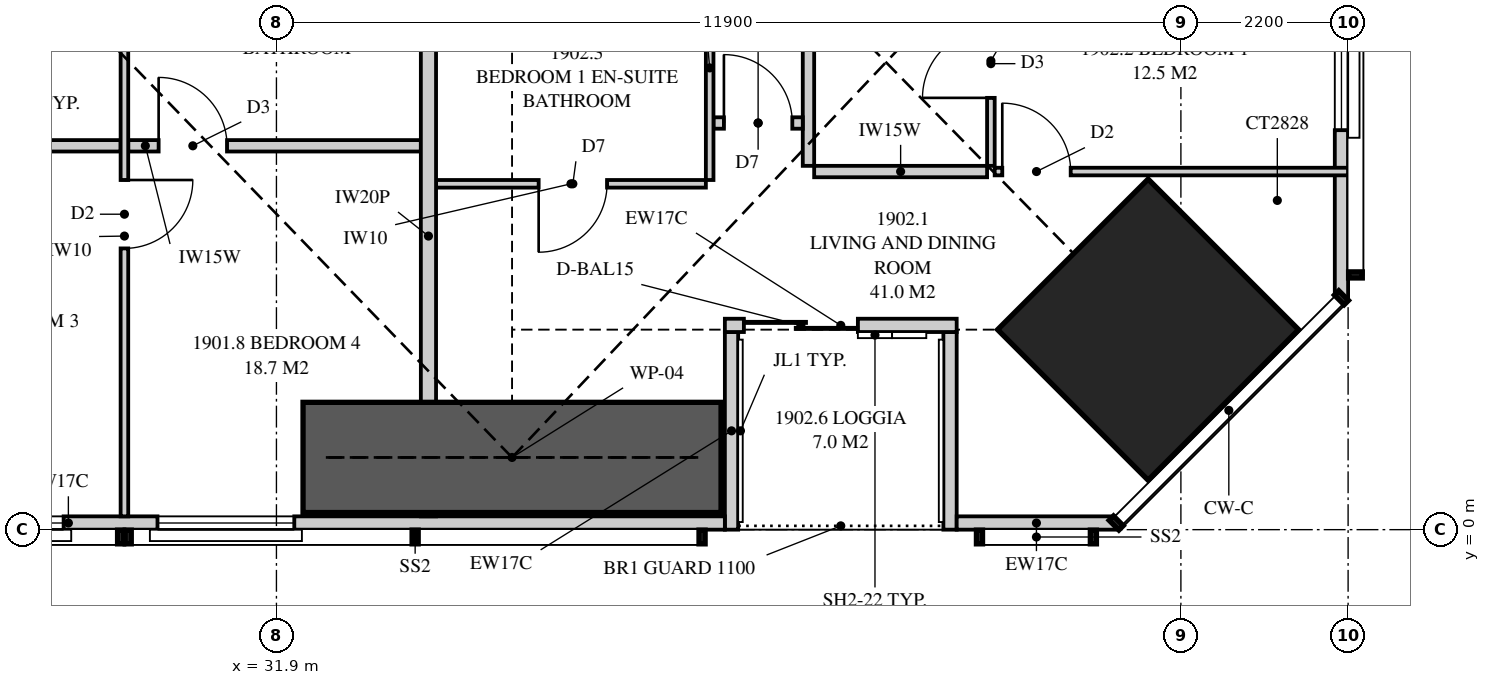
"""IFC4 building model, lengths in metres.
Left out: names, types, materials, properties, quantities, classifications, styles, units other than length and angle.
Written with IfcOpenShell. Run it as: python <this file> out.ifc"""

import sys

from ifc_helpers import new_model, si_unit, direction, frame, frame_2d, origin, origin_2d, place, context, subcontext, project, spatial, polyline, rectangle, hollow_rectangle, outline, extrude, element, fill, save


model = new_model("IFC4")
c1 = context("Model", 3, precision=1e-05, world=origin(), true_north=direction((0.0, 1.0)))
c2 = subcontext(c1, "Body", "Model", "MODEL_VIEW")
j1 = project(units=[si_unit("LENGTHUNIT", "METRE"), si_unit("PLANEANGLEUNIT", "RADIAN")], contexts=[c1])
p1 = place(None, origin())
s1 = spatial("IfcSite", under=j1, at=p1, CompositionType="ELEMENT")
p2 = place(p1, origin())
s2 = spatial("IfcBuilding", under=s1, at=p2, CompositionType="ELEMENT")
p3 = place(p2, frame((0.0, 0.0, 71.25)))
s3 = spatial("IfcBuildingStorey", under=s2, at=p3, CompositionType="ELEMENT", Elevation=71.25)
p4 = place(p3, frame((43.369, 2.631, 0.0), z_axis=(0.0, 0.0, 1.0), x_axis=(-0.707106781187, 0.707106781187, 0.0)))
e1 = element("IfcColumn", 1, at=p4, inside=s3, PredefinedType="COLUMN", context=c2, shape_type="SweptSolid", body=[
    extrude(hollow_rectangle(XDim=2.8, YDim=2.8, WallThickness=0.25, at=origin_2d()), origin(), (0.0, 0.0, 1.0), 3.5),
])
p5 = place(p3, frame((20.525, 0.087, 0.0), z_axis=(0.0, 0.0, 1.0), x_axis=(1.0, 0.0, 0.0)))
e2 = element("IfcWall", 2, at=p5, inside=s3, PredefinedType="SOLIDWALL", context=c2, shape_type="SweptSolid", body=[
    extrude(rectangle(XDim=17.275, YDim=0.175, at=frame_2d((8.638, 0.0))), origin(), (0.0, 0.0, 1.0), 3.22),
])
p6 = place(p5, frame((6.775, 0.0, 0.4)))
e3 = element("IfcOpeningElement", 3, at=p6, cuts=e2, PredefinedType="OPENING", context=c2, shape_type="SweptSolid", body=[
    extrude(rectangle(XDim=1.8, YDim=1.85, at=frame_2d((0.9, 0.925))), frame((0.0, 0.097, 0.0), z_axis=(0.0, -1.0, 0.0), x_axis=(1.0, 0.0, 0.0)), (0.0, 0.0, 1.0), 0.195),
])
p7 = place(p5, frame((9.81, 0.0, 0.4)))
e4 = element("IfcOpeningElement", 4, at=p7, cuts=e2, PredefinedType="OPENING", context=c2, shape_type="SweptSolid", body=[
    extrude(rectangle(XDim=1.8, YDim=1.85, at=frame_2d((0.9, 0.925))), frame((0.0, 0.097, 0.0), z_axis=(0.0, -1.0, 0.0), x_axis=(1.0, 0.0, 0.0)), (0.0, 0.0, 1.0), 0.195),
])
p8 = place(p3, frame((40.85, 0.087, 0.0), z_axis=(0.0, 0.0, 1.0), x_axis=(1.0, 0.0, 0.0)))
e5 = element("IfcWall", 5, at=p8, inside=s3, PredefinedType="SOLIDWALL", context=c2, shape_type="SweptSolid", body=[
    extrude(rectangle(XDim=2.099, YDim=0.175, at=frame_2d((1.049, 0.0))), origin(), (0.0, 0.0, 1.0), 3.22),
])
p9 = place(p3, frame((37.8, 2.688, 0.0), z_axis=(0.0, 0.0, 1.0), x_axis=(1.0, 0.0, 0.0)))
e6 = element("IfcWall", 6, at=p9, inside=s3, PredefinedType="SOLIDWALL", context=c2, shape_type="SweptSolid", body=[
    extrude(outline(polyline([(0.0, 0.0), (3.05, 0.0), (3.05, 2.1), (1.859, 2.1), (1.859, 2.62), (0.0, 2.62), (0.0, 0.0)])), frame((0.0, 0.087, 0.0), z_axis=(0.0, -1.0, 0.0), x_axis=(1.0, 0.0, 0.0)), (0.0, 0.0, 1.0), 0.175),
])
p10 = place(p9, frame((0.25, 0.0, 0.0)))
e7 = element("IfcOpeningElement", 7, at=p10, cuts=e6, PredefinedType="OPENING", context=c2, shape_type="SweptSolid", body=[
    extrude(rectangle(XDim=1.5, YDim=2.25, at=frame_2d((0.75, 1.125))), frame((0.0, 0.097, 0.0), z_axis=(0.0, -1.0, 0.0), x_axis=(1.0, 0.0, 0.0)), (0.0, 0.0, 1.0), 0.195),
])
p11 = place(p3, frame((37.887, 0.0, 0.0), z_axis=(0.0, 0.0, 1.0), x_axis=(0.0, 1.0, 0.0)))
e8 = element("IfcWall", 8, at=p11, inside=s3, PredefinedType="SOLIDWALL", context=c2, shape_type="SweptSolid", body=[
    extrude(outline(polyline([(0.0, 0.0), (2.6, 0.0), (2.6, 2.62), (2.262, 2.62), (2.262, 2.1), (0.799, 2.1), (0.799, 3.22), (0.0, 3.22), (0.0, 0.0)])), frame((0.0, 0.087, 0.0), z_axis=(0.0, -1.0, 0.0), x_axis=(1.0, 0.0, 0.0)), (0.0, 0.0, 1.0), 0.175),
])
p12 = place(p3, frame((40.762, 0.0, 0.0), z_axis=(0.0, 0.0, 1.0), x_axis=(0.0, 1.0, 0.0)))
e9 = element("IfcWall", 9, at=p12, inside=s3, PredefinedType="SOLIDWALL", context=c2, shape_type="SweptSolid", body=[
    extrude(outline(polyline([(0.0, 0.0), (2.6, 0.0), (2.6, 2.1), (1.376, 2.1), (1.376, 2.62), (1.334, 2.62), (1.334, 3.22), (0.0, 3.22), (0.0, 0.0)])), frame((0.0, 0.087, 0.0), z_axis=(0.0, -1.0, 0.0), x_axis=(1.0, 0.0, 0.0)), (0.0, 0.0, 1.0), 0.175),
])
p13 = place(p3, frame((45.913, 3.051, 0.0), z_axis=(0.0, 0.0, 1.0), x_axis=(0.0, 1.0, 0.0)))
e10 = element("IfcWall", 10, at=p13, inside=s3, PredefinedType="SOLIDWALL", context=c2, shape_type="SweptSolid", body=[
    extrude(outline(polyline([(0.0, 0.0), (31.897, 0.0), (31.897, 3.22), (21.495, 3.22), (21.495, 2.256), (18.993, 3.22), (0.0, 3.22), (0.0, 0.0)])), frame((0.0, 0.087, 0.0), z_axis=(0.0, -1.0, 0.0), x_axis=(1.0, 0.0, 0.0)), (0.0, 0.0, 1.0), 0.175),
])
p14 = place(p13, frame((2.204, 0.0, 0.4)))
e11 = element("IfcOpeningElement", 11, at=p14, cuts=e10, PredefinedType="OPENING", context=c2, shape_type="SweptSolid", body=[
    extrude(rectangle(XDim=1.8, YDim=1.85, at=frame_2d((0.9, 0.925))), frame((0.0, 0.097, 0.0), z_axis=(0.0, -1.0, 0.0), x_axis=(1.0, 0.0, 0.0)), (0.0, 0.0, 1.0), 0.195),
])
p15 = place(p13, frame((14.849, 0.0, 0.4)))
e12 = element("IfcOpeningElement", 12, at=p15, cuts=e10, PredefinedType="OPENING", context=c2, shape_type="SweptSolid", body=[
    extrude(rectangle(XDim=1.2, YDim=1.85, at=frame_2d((0.6, 0.925))), frame((0.0, 0.097, 0.0), z_axis=(0.0, -1.0, 0.0), x_axis=(1.0, 0.0, 0.0)), (0.0, 0.0, 1.0), 0.195),
])
p16 = place(p13, frame((27.393, 0.0, 0.4)))
e13 = element("IfcOpeningElement", 13, at=p16, cuts=e10, PredefinedType="OPENING", context=c2, shape_type="SweptSolid", body=[
    extrude(rectangle(XDim=1.8, YDim=1.85, at=frame_2d((0.9, 0.925))), frame((0.0, 0.097, 0.0), z_axis=(0.0, -1.0, 0.0), x_axis=(1.0, 0.0, 0.0)), (0.0, 0.0, 1.0), 0.195),
])
p17 = place(p3, frame((33.9, 0.175, 0.0), z_axis=(0.0, 0.0, 1.0), x_axis=(0.0, 1.0, 0.0)))
e14 = element("IfcWall", 14, at=p17, inside=s3, PredefinedType="PARTITIONING", context=c2, shape_type="SweptSolid", body=[
    extrude(outline(polyline([(7.375, 0.0), (7.375, 3.22), (2.355, 3.22), (2.355, 2.641), (1.475, 2.641), (1.475, 2.1), (1.021, 2.1), (1.021, 1.499), (0.529, 1.499), (0.529, 2.1), (0.075, 2.1), (0.075, 3.22), (0.0, 3.22), (0.0, 0.0), (0.529, 0.0), (0.529, 0.802), (1.021, 0.802), (1.021, 0.0), (7.375, 0.0)])), frame((0.0, 0.1, 0.0), z_axis=(0.0, -1.0, 0.0), x_axis=(1.0, 0.0, 0.0)), (0.0, 0.0, 1.0), 0.2),
])
p18 = place(p3, frame((29.9, 0.175, 0.0), z_axis=(0.0, 0.0, 1.0), x_axis=(0.0, 1.0, 0.0)))
e15 = element("IfcWall", 15, at=p18, inside=s3, PredefinedType="PARTITIONING", context=c2, shape_type="SweptSolid", body=[
    extrude(outline(polyline([(0.0, 0.0), (7.375, 0.0), (7.375, 3.22), (6.436, 3.22), (6.436, 2.641), (5.654, 2.641), (5.654, 3.22), (1.475, 3.22), (1.475, 2.1), (0.075, 2.1), (0.075, 3.22), (0.0, 3.22), (0.0, 0.0)])), frame((0.0, 0.05, 0.0), z_axis=(0.0, -1.0, 0.0), x_axis=(1.0, 0.0, 0.0)), (0.0, 0.0, 1.0), 0.1),
])
p19 = place(p18, frame((3.525, 0.0, 0.0)))
e16 = element("IfcOpeningElement", 16, at=p19, cuts=e15, PredefinedType="OPENING", context=c2, shape_type="SweptSolid", body=[
    extrude(rectangle(XDim=0.9, YDim=2.1, at=frame_2d((0.45, 1.05))), frame((0.0, 0.06, 0.0), z_axis=(0.0, -1.0, 0.0), x_axis=(1.0, 0.0, 0.0)), (0.0, 0.0, 1.0), 0.12),
])
p20 = place(p3, frame((26.55, 5.05, 0.0), z_axis=(0.0, 0.0, 1.0), x_axis=(1.0, 0.0, 0.0)))
e17 = element("IfcWall", 17, at=p20, inside=s3, PredefinedType="PLUMBINGWALL", context=c2, shape_type="SweptSolid", body=[
    extrude(outline(polyline([(0.0, 0.0), (3.3, 0.0), (3.3, 3.22), (1.167, 3.22), (1.167, 2.641), (0.434, 2.641), (0.434, 3.22), (0.0, 3.22), (0.0, 0.0)])), frame((0.0, 0.075, 0.0), z_axis=(0.0, -1.0, 0.0), x_axis=(1.0, 0.0, 0.0)), (0.0, 0.0, 1.0), 0.15),
])
p21 = place(p20, frame((0.4, 0.0, 0.0)))
e18 = element("IfcOpeningElement", 18, at=p21, cuts=e17, PredefinedType="OPENING", context=c2, shape_type="SweptSolid", body=[
    extrude(rectangle(XDim=0.9, YDim=2.1, at=frame_2d((0.45, 1.05))), frame((0.0, 0.085, 0.0), z_axis=(0.0, -1.0, 0.0), x_axis=(1.0, 0.0, 0.0)), (0.0, 0.0, 1.0), 0.17),
])
p22 = place(p3, frame((29.95, 5.05, 0.0), z_axis=(0.0, 0.0, 1.0), x_axis=(1.0, 0.0, 0.0)))
e19 = element("IfcWall", 19, at=p22, inside=s3, PredefinedType="PLUMBINGWALL", context=c2, shape_type="SweptSolid", body=[
    extrude(outline(polyline([(0.0, 0.0), (3.85, 0.0), (3.85, 3.22), (1.483, 3.22), (1.483, 2.641), (0.681, 2.641), (0.681, 3.22), (0.0, 3.22), (0.0, 0.0)])), frame((0.0, 0.075, 0.0), z_axis=(0.0, -1.0, 0.0), x_axis=(1.0, 0.0, 0.0)), (0.0, 0.0, 1.0), 0.15),
])
p23 = place(p22, frame((0.4, 0.0, 0.0)))
e20 = element("IfcOpeningElement", 20, at=p23, cuts=e19, PredefinedType="OPENING", context=c2, shape_type="SweptSolid", body=[
    extrude(rectangle(XDim=0.9, YDim=2.1, at=frame_2d((0.45, 1.05))), frame((0.0, 0.085, 0.0), z_axis=(0.0, -1.0, 0.0), x_axis=(1.0, 0.0, 0.0)), (0.0, 0.0, 1.0), 0.17),
])
p24 = place(p3, frame((41.3, 4.786, 0.0), z_axis=(0.0, 0.0, 1.0), x_axis=(0.0, 1.0, 0.0)))
e21 = element("IfcWall", 21, at=p24, inside=s3, PredefinedType="PARTITIONING", context=c2, shape_type="SweptSolid", body=[
    extrude(outline(polyline([(0.0, 0.0), (2.764, 0.0), (2.764, 2.641), (2.425, 2.641), (2.425, 3.22), (0.344, 3.22), (0.344, 2.641), (0.0, 2.641), (0.0, 0.0)])), frame((0.0, 0.05, 0.0), z_axis=(0.0, -1.0, 0.0), x_axis=(1.0, 0.0, 0.0)), (0.0, 0.0, 1.0), 0.1),
])
p25 = place(p24, frame((0.894, 0.0, 0.0)))
e22 = element("IfcOpeningElement", 22, at=p25, cuts=e21, PredefinedType="OPENING", context=c2, shape_type="SweptSolid", body=[
    extrude(rectangle(XDim=0.9, YDim=2.1, at=frame_2d((0.45, 1.05))), frame((0.0, 0.06, 0.0), z_axis=(0.0, -1.0, 0.0), x_axis=(1.0, 0.0, 0.0)), (0.0, 0.0, 1.0), 0.12),
])
p26 = place(p3, frame((41.35, 4.711, 0.0), z_axis=(0.0, 0.0, 1.0), x_axis=(1.0, 0.0, 0.0)))
e23 = element("IfcWall", 23, at=p26, inside=s3, PredefinedType="PARTITIONING", context=c2, shape_type="SweptSolid", body=[
    extrude(outline(polyline([(0.0, 0.0), (4.65, 0.0), (4.65, 3.22), (3.471, 3.22), (3.471, 3.104), (3.433, 3.052), (3.073, 3.003), (3.073, 2.1), (1.639, 2.1), (1.639, 3.22), (0.359, 3.22), (0.359, 2.641), (0.0, 2.641), (0.0, 0.0)])), frame((0.0, 0.05, 0.0), z_axis=(0.0, -1.0, 0.0), x_axis=(1.0, 0.0, 0.0)), (0.0, 0.0, 1.0), 0.1),
])
p27 = place(p26, frame((0.1, 0.0, 0.0)))
e24 = element("IfcOpeningElement", 24, at=p27, cuts=e23, PredefinedType="OPENING", context=c2, shape_type="SweptSolid", body=[
    extrude(rectangle(XDim=0.9, YDim=2.1, at=frame_2d((0.45, 1.05))), frame((0.0, 0.06, 0.0), z_axis=(0.0, -1.0, 0.0), x_axis=(1.0, 0.0, 0.0)), (0.0, 0.0, 1.0), 0.12),
])
p28 = place(p3, frame((38.975, 4.711, 0.0), z_axis=(0.0, 0.0, 1.0), x_axis=(1.0, 0.0, 0.0)))
e25 = element("IfcWall", 25, at=p28, inside=s3, PredefinedType="PLUMBINGWALL", context=c2, shape_type="SweptSolid", body=[
    extrude(outline(polyline([(0.0, 0.0), (2.275, 0.0), (2.275, 2.641), (1.95, 2.641), (1.95, 3.22), (0.0, 3.22), (0.0, 0.0)])), frame((0.0, 0.075, 0.0), z_axis=(0.0, -1.0, 0.0), x_axis=(1.0, 0.0, 0.0)), (0.0, 0.0, 1.0), 0.15),
])
p29 = place(p3, frame((38.9, 4.786, 0.0), z_axis=(0.0, 0.0, 1.0), x_axis=(0.0, 1.0, 0.0)))
e26 = element("IfcWall", 26, at=p29, inside=s3, PredefinedType="PLUMBINGWALL", context=c2, shape_type="SweptSolid", body=[
    extrude(outline(polyline([(0.0, 0.0), (2.764, 0.0), (2.764, 2.641), (1.99, 2.641), (1.99, 3.22), (0.708, 3.22), (0.708, 2.641), (0.0, 2.641), (0.0, 0.0)])), frame((0.0, 0.075, 0.0), z_axis=(0.0, -1.0, 0.0), x_axis=(1.0, 0.0, 0.0)), (0.0, 0.0, 1.0), 0.15),
])
p30 = place(p3, frame((34.0, 4.55, 0.0), z_axis=(0.0, 0.0, 1.0), x_axis=(1.0, 0.0, 0.0)))
e27 = element("IfcWall", 27, at=p30, inside=s3, PredefinedType="PARTITIONING", context=c2, shape_type="SweptSolid", body=[
    extrude(outline(polyline([(0.0, 0.0), (3.55, 0.0), (3.55, 3.22), (1.299, 3.22), (1.299, 2.621), (0.701, 2.621), (0.701, 3.22), (0.0, 3.22), (0.0, 0.0)])), frame((0.0, 0.05, 0.0), z_axis=(0.0, -1.0, 0.0), x_axis=(1.0, 0.0, 0.0)), (0.0, 0.0, 1.0), 0.1),
])
p31 = place(p30, frame((1.35, 0.0, 0.0)))
e28 = element("IfcOpeningElement", 28, at=p31, cuts=e27, PredefinedType="OPENING", context=c2, shape_type="SweptSolid", body=[
    extrude(rectangle(XDim=0.9, YDim=2.1, at=frame_2d((0.45, 1.05))), frame((0.0, 0.06, 0.0), z_axis=(0.0, -1.0, 0.0), x_axis=(1.0, 0.0, 0.0)), (0.0, 0.0, 1.0), 0.12),
])
p32 = place(p3, frame((37.6, 4.6, 0.0), z_axis=(0.0, 0.0, 1.0), x_axis=(0.0, 1.0, 0.0)))
e29 = element("IfcWall", 29, at=p32, inside=s3, PredefinedType="PARTITIONING", context=c2, shape_type="SweptSolid", body=[
    extrude(rectangle(XDim=2.95, YDim=0.1, at=frame_2d((1.475, 0.0))), origin(), (0.0, 0.0, 1.0), 3.22),
])
p33 = place(p3, frame((37.65, 5.35, 0.0), z_axis=(0.0, 0.0, 1.0), x_axis=(1.0, 0.0, 0.0)))
e30 = element("IfcWall", 30, at=p33, inside=s3, PredefinedType="PLUMBINGWALL", context=c2, shape_type="SweptSolid", body=[
    extrude(outline(polyline([(0.0, 0.0), (1.175, 0.0), (1.175, 2.641), (1.117, 2.641), (1.117, 3.22), (0.0, 3.22), (0.0, 0.0)])), frame((0.0, 0.075, 0.0), z_axis=(0.0, -1.0, 0.0), x_axis=(1.0, 0.0, 0.0)), (0.0, 0.0, 1.0), 0.15),
])
p34 = place(p33, frame((0.137, 0.0, 0.0)))
e31 = element("IfcOpeningElement", 31, at=p34, cuts=e30, PredefinedType="OPENING", context=c2, shape_type="SweptSolid", body=[
    extrude(rectangle(XDim=0.9, YDim=2.1, at=frame_2d((0.45, 1.05))), frame((0.0, 0.085, 0.0), z_axis=(0.0, -1.0, 0.0), x_axis=(1.0, 0.0, 0.0)), (0.0, 0.0, 1.0), 0.17),
])
p35 = place(p3, frame((32.25, 0.95, 0.0), z_axis=(0.0, 0.0, 1.0), x_axis=(1.0, 0.0, 0.0)))
e32 = element("IfcWall", 32, at=p35, inside=s3, PredefinedType="SHEAR", context=c2, shape_type="SweptSolid", body=[
    extrude(rectangle(XDim=5.5, YDim=1.45, at=frame_2d((2.75, 0.0))), origin(), (0.0, 0.0, 1.0), 3.5),
])
p36 = place(p6, origin())
e33 = element("IfcWindow", 33, at=p36, inside=s3, PartitioningType="SINGLE_PANEL", PredefinedType="WINDOW", context=c2, shape_type="SweptSolid", body=[
    extrude(rectangle(XDim=1.8, YDim=1.85, at=frame_2d((0.9, 0.925))), frame((0.0, 0.03, 0.0), z_axis=(0.0, -1.0, 0.0), x_axis=(1.0, 0.0, 0.0)), (0.0, 0.0, 1.0), 0.06),
])
fill(e3, e33)
p37 = place(p7, origin())
e34 = element("IfcWindow", 34, at=p37, inside=s3, PartitioningType="SINGLE_PANEL", PredefinedType="WINDOW", context=c2, shape_type="SweptSolid", body=[
    extrude(rectangle(XDim=1.8, YDim=1.85, at=frame_2d((0.9, 0.925))), frame((0.0, 0.03, 0.0), z_axis=(0.0, -1.0, 0.0), x_axis=(1.0, 0.0, 0.0)), (0.0, 0.0, 1.0), 0.06),
])
fill(e4, e34)
p38 = place(p10, origin())
e35 = element("IfcDoor", 35, at=p38, inside=s3, OperationType="SLIDING_TO_LEFT", PredefinedType="DOOR", context=c2, shape_type="SweptSolid", body=[
    extrude(rectangle(XDim=1.5, YDim=2.25, at=frame_2d((0.75, 1.125))), frame((0.0, 0.025, 0.0), z_axis=(0.0, -1.0, 0.0), x_axis=(1.0, 0.0, 0.0)), (0.0, 0.0, 1.0), 0.05),
])
fill(e7, e35)
p39 = place(p14, origin())
e36 = element("IfcWindow", 36, at=p39, inside=s3, PartitioningType="SINGLE_PANEL", PredefinedType="WINDOW", context=c2, shape_type="SweptSolid", body=[
    extrude(rectangle(XDim=1.8, YDim=1.85, at=frame_2d((0.9, 0.925))), frame((0.0, 0.03, 0.0), z_axis=(0.0, -1.0, 0.0), x_axis=(1.0, 0.0, 0.0)), (0.0, 0.0, 1.0), 0.06),
])
fill(e11, e36)
p40 = place(p19, frame((0.9, 0.0, 0.0), z_axis=(0.0, 0.0, 1.0), x_axis=(-1.0, 0.0, 0.0)))
e37 = element("IfcDoor", 37, at=p40, inside=s3, OperationType="SINGLE_SWING_LEFT", PredefinedType="DOOR", context=c2, shape_type="SweptSolid", body=[
    extrude(rectangle(XDim=0.9, YDim=2.1, at=frame_2d((0.45, 1.05))), frame((0.0, 0.025, 0.0), z_axis=(0.0, -1.0, 0.0), x_axis=(1.0, 0.0, 0.0)), (0.0, 0.0, 1.0), 0.05),
])
fill(e16, e37)
p41 = place(p23, origin())
e38 = element("IfcDoor", 38, at=p41, inside=s3, OperationType="SINGLE_SWING_LEFT", PredefinedType="DOOR", context=c2, shape_type="SweptSolid", body=[
    extrude(rectangle(XDim=0.9, YDim=2.1, at=frame_2d((0.45, 1.05))), frame((0.0, 0.025, 0.0), z_axis=(0.0, -1.0, 0.0), x_axis=(1.0, 0.0, 0.0)), (0.0, 0.0, 1.0), 0.05),
])
fill(e20, e38)
p42 = place(p27, origin())
e39 = element("IfcDoor", 39, at=p42, inside=s3, OperationType="SINGLE_SWING_LEFT", PredefinedType="DOOR", context=c2, shape_type="SweptSolid", body=[
    extrude(rectangle(XDim=0.9, YDim=2.1, at=frame_2d((0.45, 1.05))), frame((0.0, 0.025, 0.0), z_axis=(0.0, -1.0, 0.0), x_axis=(1.0, 0.0, 0.0)), (0.0, 0.0, 1.0), 0.05),
])
fill(e24, e39)
p43 = place(p25, origin())
e40 = element("IfcDoor", 40, at=p43, inside=s3, OperationType="SINGLE_SWING_LEFT", PredefinedType="DOOR", context=c2, shape_type="SweptSolid", body=[
    extrude(rectangle(XDim=0.9, YDim=2.1, at=frame_2d((0.45, 1.05))), frame((0.0, 0.025, 0.0), z_axis=(0.0, -1.0, 0.0), x_axis=(1.0, 0.0, 0.0)), (0.0, 0.0, 1.0), 0.05),
])
fill(e22, e40)
p44 = place(p31, frame((0.9, 0.0, 0.0), z_axis=(0.0, 0.0, 1.0), x_axis=(-1.0, 0.0, 0.0)))
e41 = element("IfcDoor", 41, at=p44, inside=s3, OperationType="SINGLE_SWING_RIGHT", PredefinedType="DOOR", context=c2, shape_type="SweptSolid", body=[
    extrude(rectangle(XDim=0.9, YDim=2.1, at=frame_2d((0.45, 1.05))), frame((0.0, 0.025, 0.0), z_axis=(0.0, -1.0, 0.0), x_axis=(1.0, 0.0, 0.0)), (0.0, 0.0, 1.0), 0.05),
])
fill(e28, e41)
p45 = place(p34, origin())
e42 = element("IfcDoor", 42, at=p45, inside=s3, OperationType="SINGLE_SWING_LEFT", PredefinedType="DOOR", context=c2, shape_type="SweptSolid", body=[
    extrude(rectangle(XDim=0.9, YDim=2.1, at=frame_2d((0.45, 1.05))), frame((0.0, 0.025, 0.0), z_axis=(0.0, -1.0, 0.0), x_axis=(1.0, 0.0, 0.0)), (0.0, 0.0, 1.0), 0.05),
])
fill(e31, e42)
save(model, sys.argv[1])
